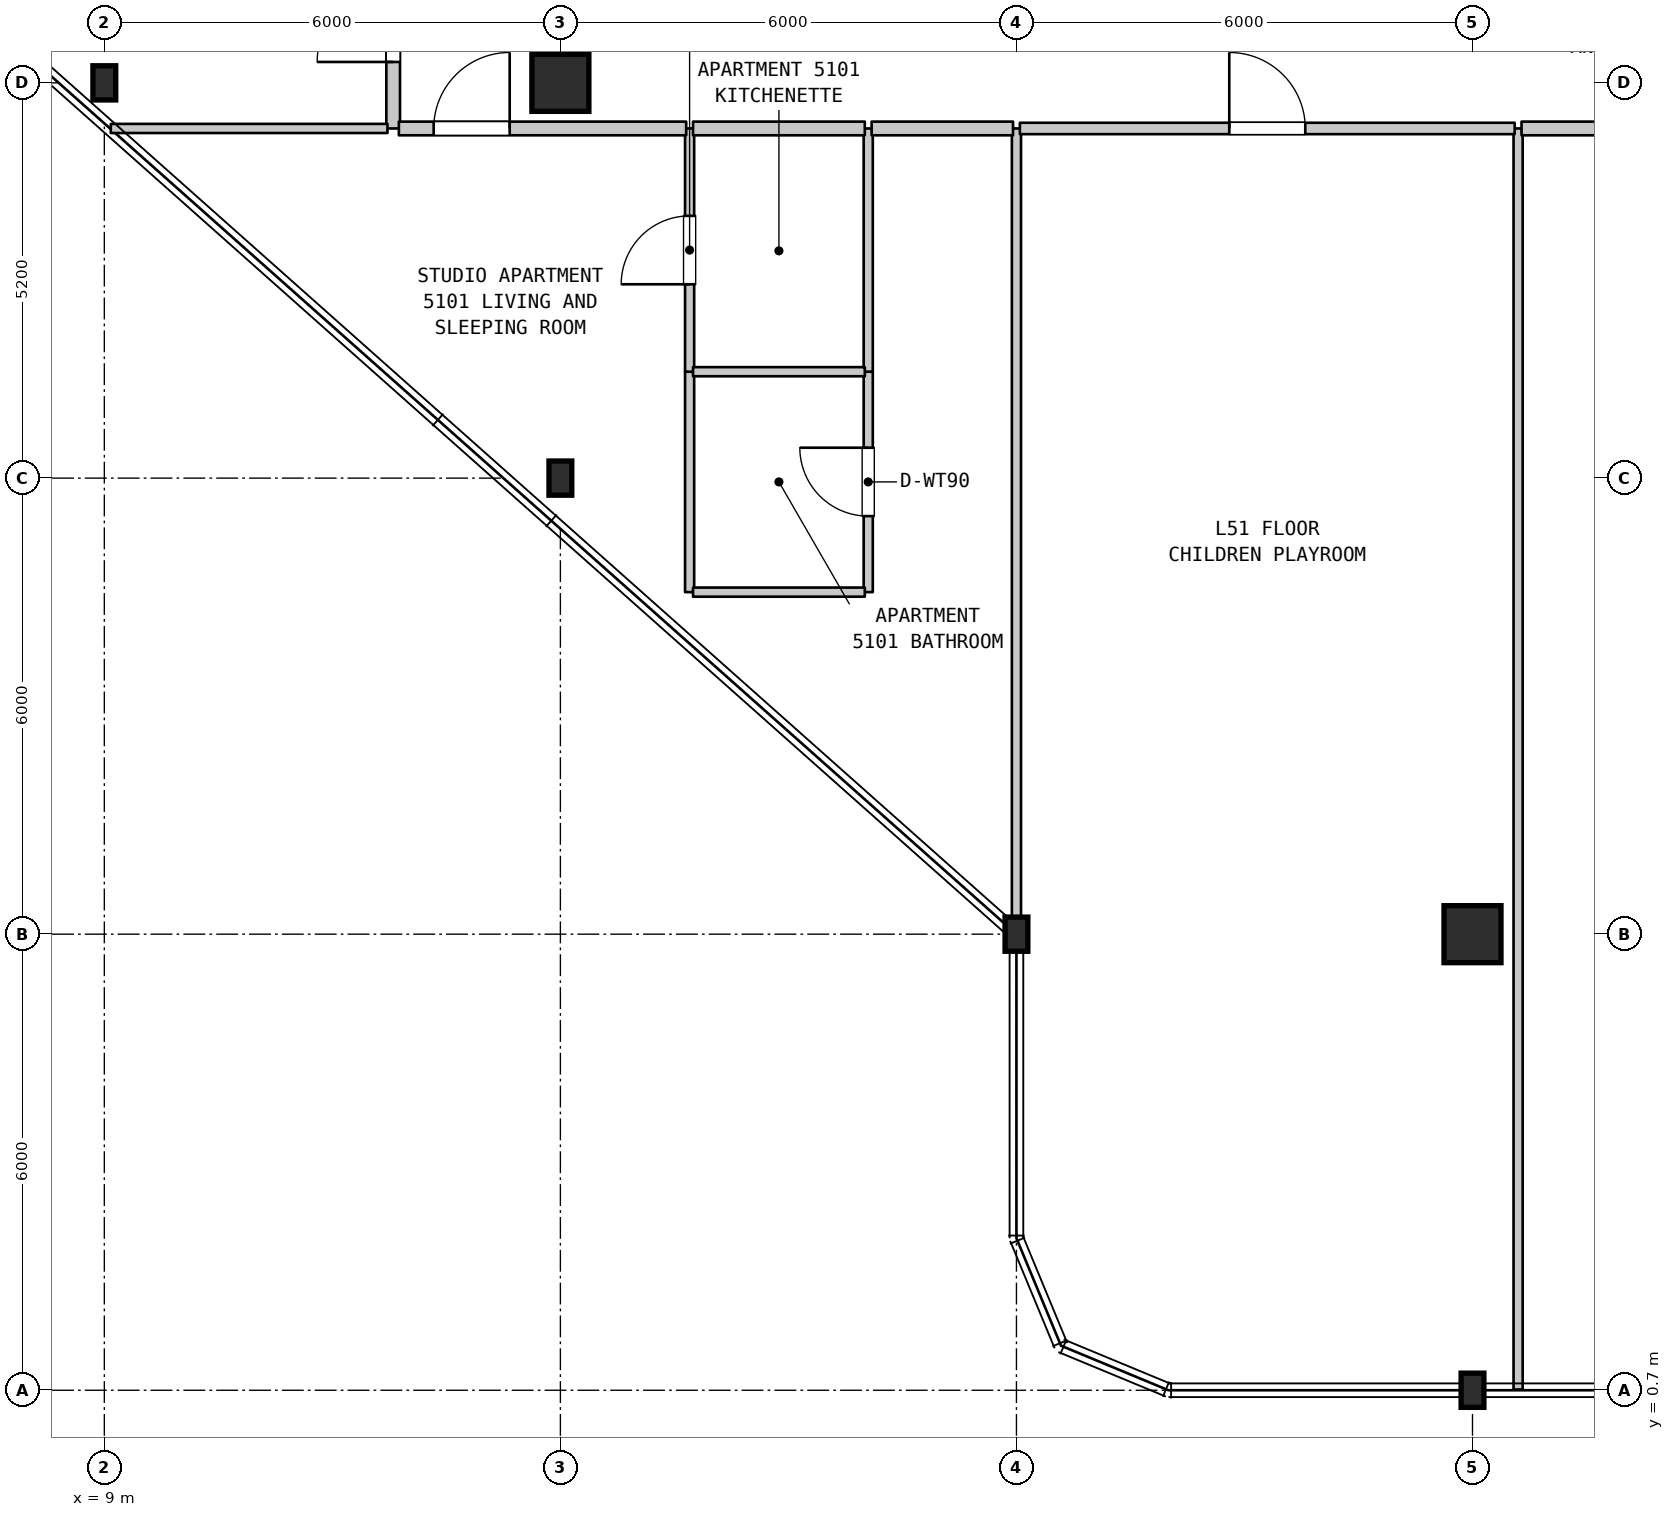
"""IFC4 building model, lengths in metres.
Left out: names, types, materials, properties, quantities, classifications, styles, units other than length and angle.
Written with IfcOpenShell. Run it as: python <this file> out.ifc"""

import sys

from ifc_helpers import new_model, si_unit, direction, frame, frame_2d, origin, origin_2d, place, context, subcontext, project, spatial, rectangle, i_section, extrude, element, fill, save


model = new_model("IFC4")
c1 = context("Model", 3, precision=1e-05, world=origin(), true_north=direction((0.0, 1.0)))
c2 = subcontext(c1, "Body", "Model", "MODEL_VIEW")
j1 = project(units=[si_unit("LENGTHUNIT", "METRE"), si_unit("PLANEANGLEUNIT", "RADIAN")], contexts=[c1])
p1 = place(None, origin())
s1 = spatial("IfcSite", under=j1, at=p1, CompositionType="ELEMENT")
p2 = place(p1, origin())
s2 = spatial("IfcBuilding", under=s1, at=p2, CompositionType="ELEMENT")
p3 = place(p2, frame((0.0, 0.0, 206.9)))
s3 = spatial("IfcBuildingStorey", under=s2, at=p3, CompositionType="ELEMENT", Elevation=206.9)
for number, where, z_axis, x_axis in (
    (1, (9.0, 17.9, 0.0), (0.0, 0.0, 1.0), (1.0, 0.0, 0.0)),
    (2, (15.0, 12.7, 0.0), (0.0, 0.0, 1.0), (1.0, 0.0, 0.0)),
):
    element("IfcColumn", number, at=place(p3, frame(where, z_axis=z_axis, x_axis=x_axis)), inside=s3, PredefinedType="COLUMN", context=c2, shape_type="SweptSolid", body=[
        extrude(i_section(OverallWidth=0.3, OverallDepth=0.45, WebThickness=0.014, FlangeThickness=0.026, FilletRadius=0.027, at=origin_2d()), origin(), (0.0, 0.0, 1.0), 3.7),
    ])
p4 = place(p3, frame((15.0, 17.9, 0.0), z_axis=(0.0, 0.0, 1.0), x_axis=(1.0, 0.0, 0.0)))
e3 = element("IfcColumn", 3, at=p4, inside=s3, PredefinedType="COLUMN", context=c2, shape_type="SweptSolid", body=[
    extrude(rectangle(XDim=0.75, YDim=0.75, at=origin_2d()), origin(), (0.0, 0.0, 1.0), 3.7),
])
for number, where, z_axis, x_axis in (
    (4, (21.0, 6.7, 0.0), (0.0, 0.0, 1.0), (1.0, 0.0, 0.0)),
    (5, (27.0, 0.7, 0.0), (0.0, 0.0, 1.0), (1.0, 0.0, 0.0)),
):
    element("IfcColumn", number, at=place(p3, frame(where, z_axis=z_axis, x_axis=x_axis)), inside=s3, PredefinedType="COLUMN", context=c2, shape_type="SweptSolid", body=[
        extrude(i_section(OverallWidth=0.3, OverallDepth=0.45, WebThickness=0.014, FlangeThickness=0.026, FilletRadius=0.027, at=origin_2d()), origin(), (0.0, 0.0, 1.0), 3.7),
    ])
p5 = place(p3, frame((27.0, 6.7, 0.0), z_axis=(0.0, 0.0, 1.0), x_axis=(1.0, 0.0, 0.0)))
e6 = element("IfcColumn", 6, at=p5, inside=s3, PredefinedType="COLUMN", context=c2, shape_type="SweptSolid", body=[
    extrude(rectangle(XDim=0.75, YDim=0.75, at=origin_2d()), origin(), (0.0, 0.0, 1.0), 3.7),
])
p6 = place(p3, frame((12.8, 17.3, 0.0), z_axis=(0.0, 0.0, 1.0), x_axis=(0.0, 1.0, 0.0)))
e7 = element("IfcWall", 7, at=p6, inside=s3, PredefinedType="STANDARD", context=c2, shape_type="SweptSolid", body=[
    extrude(rectangle(XDim=2.75, YDim=0.18, at=frame_2d((1.375, 0.0))), origin(), (0.0, 0.0, 1.0), 3.39),
])
p7 = place(p6, frame((0.875, 0.0, 0.0)))
e8 = element("IfcOpeningElement", 8, at=p7, cuts=e7, PredefinedType="OPENING", context=c2, shape_type="SweptSolid", body=[
    extrude(rectangle(XDim=1.0, YDim=2.15, at=frame_2d((0.5, 1.075))), frame((0.0, 0.1, 0.0), z_axis=(0.0, -1.0, 0.0), x_axis=(1.0, 0.0, 0.0)), (0.0, 0.0, 1.0), 0.2),
])
p8 = place(p3, frame((16.7, 11.2, 0.0), z_axis=(0.0, 0.0, 1.0), x_axis=(0.0, 1.0, 0.0)))
e9 = element("IfcWall", 9, at=p8, inside=s3, PredefinedType="PARTITIONING", context=c2, shape_type="SweptSolid", body=[
    extrude(rectangle(XDim=2.9, YDim=0.12, at=frame_2d((1.45, 0.0))), origin(), (0.0, 0.0, 1.0), 3.39),
])
p9 = place(p3, frame((16.7, 14.1, 0.0), z_axis=(0.0, 0.0, 1.0), x_axis=(0.0, 1.0, 0.0)))
e10 = element("IfcWall", 10, at=p9, inside=s3, PredefinedType="PARTITIONING", context=c2, shape_type="SweptSolid", body=[
    extrude(rectangle(XDim=3.2, YDim=0.12, at=frame_2d((1.6, 0.0))), origin(), (0.0, 0.0, 1.0), 3.39),
])
p10 = place(p9, frame((1.15, 0.0, 0.0)))
e11 = element("IfcOpeningElement", 11, at=p10, cuts=e10, PredefinedType="OPENING", context=c2, shape_type="SweptSolid", body=[
    extrude(rectangle(XDim=0.9, YDim=2.15, at=frame_2d((0.45, 1.075))), frame((0.0, 0.07, 0.0), z_axis=(0.0, -1.0, 0.0), x_axis=(1.0, 0.0, 0.0)), (0.0, 0.0, 1.0), 0.14),
])
p11 = place(p3, frame((19.05, 11.2, 0.0), z_axis=(0.0, 0.0, 1.0), x_axis=(0.0, 1.0, 0.0)))
e12 = element("IfcWall", 12, at=p11, inside=s3, PredefinedType="PARTITIONING", context=c2, shape_type="SweptSolid", body=[
    extrude(rectangle(XDim=2.9, YDim=0.12, at=frame_2d((1.45, 0.0))), origin(), (0.0, 0.0, 1.0), 3.39),
])
p12 = place(p11, frame((1.0, 0.0, 0.0)))
e13 = element("IfcOpeningElement", 13, at=p12, cuts=e12, PredefinedType="OPENING", context=c2, shape_type="SweptSolid", body=[
    extrude(rectangle(XDim=0.9, YDim=2.1, at=frame_2d((0.45, 1.05))), frame((0.0, 0.07, 0.0), z_axis=(0.0, -1.0, 0.0), x_axis=(1.0, 0.0, 0.0)), (0.0, 0.0, 1.0), 0.14),
])
p13 = place(p3, frame((19.05, 14.1, 0.0), z_axis=(0.0, 0.0, 1.0), x_axis=(0.0, 1.0, 0.0)))
e14 = element("IfcWall", 14, at=p13, inside=s3, PredefinedType="PARTITIONING", context=c2, shape_type="SweptSolid", body=[
    extrude(rectangle(XDim=3.2, YDim=0.12, at=frame_2d((1.6, 0.0))), origin(), (0.0, 0.0, 1.0), 3.39),
])
p14 = place(p3, frame((21.0, 6.71, 0.0), z_axis=(0.0, 0.0, 1.0), x_axis=(0.0, 1.0, 0.0)))
e15 = element("IfcWall", 15, at=p14, inside=s3, PredefinedType="PARTITIONING", context=c2, shape_type="SweptSolid", body=[
    extrude(rectangle(XDim=10.59, YDim=0.12, at=frame_2d((5.295, 0.0))), origin(), (0.0, 0.0, 1.0), 3.39),
])
p15 = place(p3, frame((27.6, 0.71, 0.0), z_axis=(0.0, 0.0, 1.0), x_axis=(0.0, 1.0, 0.0)))
e16 = element("IfcWall", 16, at=p15, inside=s3, PredefinedType="PARTITIONING", context=c2, shape_type="SweptSolid", body=[
    extrude(rectangle(XDim=16.59, YDim=0.12, at=frame_2d((8.295, 0.0))), origin(), (0.0, 0.0, 1.0), 3.39),
])
for number, where, z_axis, x_axis in (
    (17, (16.745, 11.2, 0.0), (0.0, 0.0, 1.0), (1.0, 0.0, 0.0)),
    (18, (16.745, 14.1, 0.0), (0.0, 0.0, 1.0), (1.0, 0.0, 0.0)),
):
    element("IfcWall", number, at=place(p3, frame(where, z_axis=z_axis, x_axis=x_axis)), inside=s3, PredefinedType="PARTITIONING", context=c2, shape_type="SweptSolid", body=[
        extrude(rectangle(XDim=2.26, YDim=0.12, at=frame_2d((1.13, 0.0))), origin(), (0.0, 0.0, 1.0), 3.39),
    ])
p16 = place(p3, frame((9.085, 17.3, 0.0), z_axis=(0.0, 0.0, 1.0), x_axis=(1.0, 0.0, 0.0)))
e19 = element("IfcWall", 19, at=p16, inside=s3, PredefinedType="PARTITIONING", context=c2, shape_type="SweptSolid", body=[
    extrude(rectangle(XDim=3.64, YDim=0.12, at=frame_2d((1.82, 0.0))), origin(), (0.0, 0.0, 1.0), 3.39),
])
p17 = place(p3, frame((12.875, 17.3, 0.0), z_axis=(0.0, 0.0, 1.0), x_axis=(1.0, 0.0, 0.0)))
e20 = element("IfcWall", 20, at=p17, inside=s3, PredefinedType="STANDARD", context=c2, shape_type="SweptSolid", body=[
    extrude(rectangle(XDim=3.78, YDim=0.18, at=frame_2d((1.89, 0.0))), origin(), (0.0, 0.0, 1.0), 3.39),
])
p18 = place(p17, frame((0.458, 0.0, 0.0)))
e21 = element("IfcOpeningElement", 21, at=p18, cuts=e20, PredefinedType="OPENING", context=c2, shape_type="SweptSolid", body=[
    extrude(rectangle(XDim=1.0, YDim=2.15, at=frame_2d((0.5, 1.075))), frame((0.0, 0.1, 0.0), z_axis=(0.0, -1.0, 0.0), x_axis=(1.0, 0.0, 0.0)), (0.0, 0.0, 1.0), 0.2),
])
p19 = place(p3, frame((16.745, 17.3, 0.0), z_axis=(0.0, 0.0, 1.0), x_axis=(1.0, 0.0, 0.0)))
e22 = element("IfcWall", 22, at=p19, inside=s3, PredefinedType="STANDARD", context=c2, shape_type="SweptSolid", body=[
    extrude(rectangle(XDim=2.26, YDim=0.18, at=frame_2d((1.13, 0.0))), origin(), (0.0, 0.0, 1.0), 3.39),
])
p20 = place(p3, frame((19.095, 17.3, 0.0), z_axis=(0.0, 0.0, 1.0), x_axis=(1.0, 0.0, 0.0)))
e23 = element("IfcWall", 23, at=p20, inside=s3, PredefinedType="STANDARD", context=c2, shape_type="SweptSolid", body=[
    extrude(rectangle(XDim=1.86, YDim=0.18, at=frame_2d((0.93, 0.0))), origin(), (0.0, 0.0, 1.0), 3.39),
])
p21 = place(p3, frame((21.045, 17.3, 0.0), z_axis=(0.0, 0.0, 1.0), x_axis=(1.0, 0.0, 0.0)))
e24 = element("IfcWall", 24, at=p21, inside=s3, PredefinedType="STANDARD", context=c2, shape_type="SweptSolid", body=[
    extrude(rectangle(XDim=6.51, YDim=0.15, at=frame_2d((3.255, 0.0))), origin(), (0.0, 0.0, 1.0), 3.39),
])
p22 = place(p21, frame((2.755, 0.0, 0.0)))
e25 = element("IfcOpeningElement", 25, at=p22, cuts=e24, PredefinedType="OPENING", context=c2, shape_type="SweptSolid", body=[
    extrude(rectangle(XDim=1.0, YDim=2.15, at=frame_2d((0.5, 1.075))), frame((0.0, 0.085, 0.0), z_axis=(0.0, -1.0, 0.0), x_axis=(1.0, 0.0, 0.0)), (0.0, 0.0, 1.0), 0.17),
])
p23 = place(p3, frame((27.645, 17.3, 0.0), z_axis=(0.0, 0.0, 1.0), x_axis=(1.0, 0.0, 0.0)))
e26 = element("IfcWall", 26, at=p23, inside=s3, PredefinedType="STANDARD", context=c2, shape_type="SweptSolid", body=[
    extrude(rectangle(XDim=4.45, YDim=0.18, at=frame_2d((2.225, 0.0))), origin(), (0.0, 0.0, 1.0), 3.39),
])
p24 = place(p23, frame((1.653, 0.0, 0.0)))
e27 = element("IfcOpeningElement", 27, at=p24, cuts=e26, PredefinedType="OPENING", context=c2, shape_type="SweptSolid", body=[
    extrude(rectangle(XDim=1.0, YDim=2.15, at=frame_2d((0.5, 1.075))), frame((0.0, 0.1, 0.0), z_axis=(0.0, -1.0, 0.0), x_axis=(1.0, 0.0, 0.0)), (0.0, 0.0, 1.0), 0.2),
])
p25 = place(p7, origin())
e28 = element("IfcDoor", 28, at=p25, inside=s3, OperationType="SINGLE_SWING_LEFT", PredefinedType="DOOR", context=c2, shape_type="SweptSolid", body=[
    extrude(rectangle(XDim=1.0, YDim=2.15, at=frame_2d((0.5, 1.075))), frame((0.0, 0.025, 0.0), z_axis=(0.0, -1.0, 0.0), x_axis=(1.0, 0.0, 0.0)), (0.0, 0.0, 1.0), 0.05),
])
fill(e8, e28)
p26 = place(p10, origin())
e29 = element("IfcDoor", 29, at=p26, inside=s3, OperationType="SINGLE_SWING_LEFT", PredefinedType="DOOR", context=c2, shape_type="SweptSolid", body=[
    extrude(rectangle(XDim=0.9, YDim=2.15, at=frame_2d((0.45, 1.075))), frame((0.0, 0.025, 0.0), z_axis=(0.0, -1.0, 0.0), x_axis=(1.0, 0.0, 0.0)), (0.0, 0.0, 1.0), 0.05),
])
fill(e11, e29)
p27 = place(p12, origin())
e30 = element("IfcDoor", 30, at=p27, inside=s3, OperationType="SINGLE_SWING_RIGHT", PredefinedType="DOOR", context=c2, shape_type="SweptSolid", body=[
    extrude(rectangle(XDim=0.9, YDim=2.1, at=frame_2d((0.45, 1.05))), frame((0.0, 0.025, 0.0), z_axis=(0.0, -1.0, 0.0), x_axis=(1.0, 0.0, 0.0)), (0.0, 0.0, 1.0), 0.05),
])
fill(e13, e30)
p28 = place(p18, origin())
e31 = element("IfcDoor", 31, at=p28, inside=s3, OperationType="SINGLE_SWING_RIGHT", PredefinedType="DOOR", context=c2, shape_type="SweptSolid", body=[
    extrude(rectangle(XDim=1.0, YDim=2.15, at=frame_2d((0.5, 1.075))), frame((0.0, 0.025, 0.0), z_axis=(0.0, -1.0, 0.0), x_axis=(1.0, 0.0, 0.0)), (0.0, 0.0, 1.0), 0.05),
])
fill(e21, e31)
p29 = place(p22, origin())
e32 = element("IfcDoor", 32, at=p29, inside=s3, OperationType="SINGLE_SWING_LEFT", PredefinedType="DOOR", context=c2, shape_type="SweptSolid", body=[
    extrude(rectangle(XDim=1.0, YDim=2.15, at=frame_2d((0.5, 1.075))), frame((0.0, 0.025, 0.0), z_axis=(0.0, -1.0, 0.0), x_axis=(1.0, 0.0, 0.0)), (0.0, 0.0, 1.0), 0.05),
])
fill(e25, e32)
save(model, sys.argv[1])
